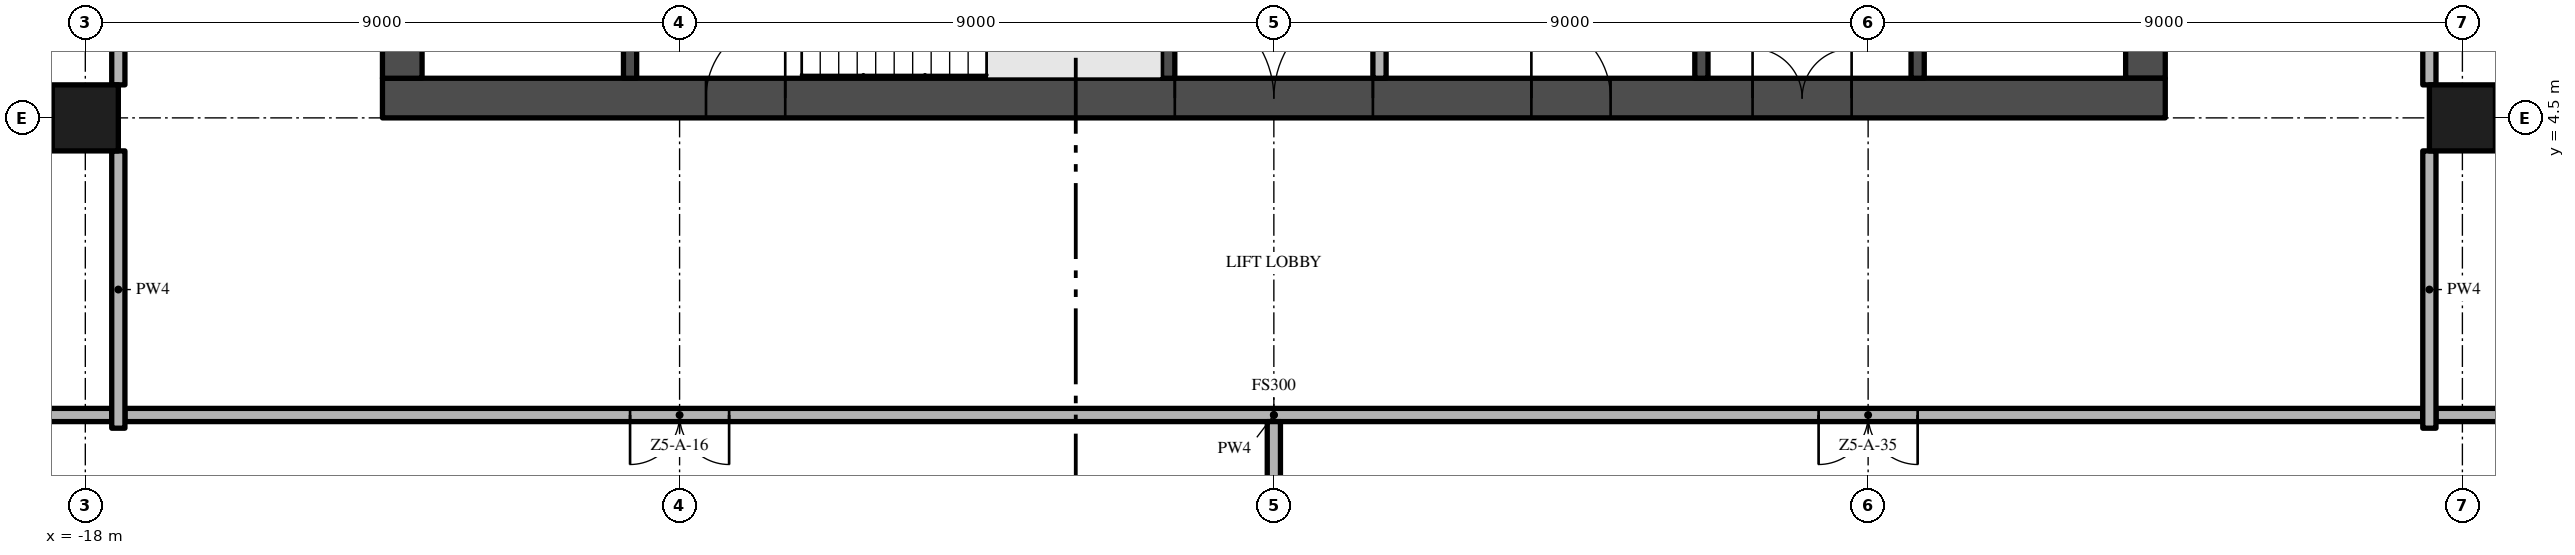
"""IFC4 building model, lengths in metres.
Left out: names, types, materials, properties, quantities, classifications, styles, units other than length and angle.
Written with IfcOpenShell. Run it as: python <this file> out.ifc"""

import sys

from ifc_helpers import new_model, si_unit, direction, frame, frame_2d, origin, origin_2d, place, context, subcontext, project, spatial, rectangle, extrude, element, fill, save


model = new_model("IFC4")
c1 = context("Model", 3, precision=1e-05, world=origin(), true_north=direction((0.0, 1.0)))
c2 = subcontext(c1, "Body", "Model", "MODEL_VIEW")
j1 = project(units=[si_unit("LENGTHUNIT", "METRE"), si_unit("PLANEANGLEUNIT", "RADIAN")], contexts=[c1])
p1 = place(None, origin())
s1 = spatial("IfcSite", under=j1, at=p1, CompositionType="ELEMENT")
p2 = place(p1, origin())
s2 = spatial("IfcBuilding", under=s1, at=p2, CompositionType="ELEMENT")
p3 = place(p2, frame((0.0, 0.0, 242.6)))
s3 = spatial("IfcBuildingStorey", under=s2, at=p3, CompositionType="ELEMENT", Elevation=242.6)
p4 = place(p3, frame((-13.5, 4.8, -0.3), z_axis=(0.0, 0.0, 1.0), x_axis=(1.0, 0.0, 0.0)))
e1 = element("IfcWall", 1, at=p4, inside=s3, PredefinedType="SHEAR", context=c2, shape_type="SweptSolid", body=[
    extrude(rectangle(XDim=27.0, YDim=0.6, at=frame_2d((13.5, 0.0))), origin(), (0.0, 0.0, 1.0), 3.8),
])
p5 = place(p4, frame((12.0, 0.0, 0.3)))
e2 = element("IfcOpeningElement", 2, at=p5, cuts=e1, PredefinedType="OPENING", context=c2, shape_type="SweptSolid", body=[
    extrude(rectangle(XDim=3.0, YDim=2.4, at=frame_2d((1.5, 1.2))), frame((0.0, 0.31, 0.0), z_axis=(0.0, -1.0, 0.0), x_axis=(1.0, 0.0, 0.0)), (0.0, 0.0, 1.0), 0.62),
])
p6 = place(p4, frame((4.9, 0.0, 0.3)))
e3 = element("IfcOpeningElement", 3, at=p6, cuts=e1, PredefinedType="OPENING", context=c2, shape_type="SweptSolid", body=[
    extrude(rectangle(XDim=1.2, YDim=2.2, at=frame_2d((0.6, 1.1))), frame((0.0, 0.31, 0.0), z_axis=(0.0, -1.0, 0.0), x_axis=(1.0, 0.0, 0.0)), (0.0, 0.0, 1.0), 0.62),
])
p7 = place(p4, frame((20.75, 0.0, 0.3)))
e4 = element("IfcOpeningElement", 4, at=p7, cuts=e1, PredefinedType="OPENING", context=c2, shape_type="SweptSolid", body=[
    extrude(rectangle(XDim=1.5, YDim=2.2, at=frame_2d((0.75, 1.1))), frame((0.0, 0.31, 0.0), z_axis=(0.0, -1.0, 0.0), x_axis=(1.0, 0.0, 0.0)), (0.0, 0.0, 1.0), 0.62),
])
p8 = place(p4, frame((17.4, 0.0, 0.3)))
e5 = element("IfcOpeningElement", 5, at=p8, cuts=e1, PredefinedType="OPENING", context=c2, shape_type="SweptSolid", body=[
    extrude(rectangle(XDim=1.2, YDim=2.2, at=frame_2d((0.6, 1.1))), frame((0.0, 0.31, 0.0), z_axis=(0.0, -1.0, 0.0), x_axis=(1.0, 0.0, 0.0)), (0.0, 0.0, 1.0), 0.62),
])
p9 = place(p3, frame((13.2, 5.1, -0.3), z_axis=(0.0, 0.0, 1.0), x_axis=(0.0, 1.0, 0.0)))
e6 = element("IfcWall", 6, at=p9, inside=s3, PredefinedType="SHEAR", context=c2, shape_type="SweptSolid", body=[
    extrude(rectangle(XDim=16.8, YDim=0.6, at=frame_2d((8.4, 0.0))), origin(), (0.0, 0.0, 1.0), 3.8),
])
p10 = place(p9, frame((6.3, 0.0, 0.3)))
e7 = element("IfcOpeningElement", 7, at=p10, cuts=e6, PredefinedType="OPENING", context=c2, shape_type="SweptSolid", body=[
    extrude(rectangle(XDim=1.2, YDim=2.2, at=frame_2d((0.6, 1.1))), frame((0.0, 0.31, 0.0), z_axis=(0.0, -1.0, 0.0), x_axis=(1.0, 0.0, 0.0)), (0.0, 0.0, 1.0), 0.62),
])
p11 = place(p3, frame((-13.2, 21.9, -0.3), z_axis=(0.0, 0.0, 1.0), x_axis=(0.0, -1.0, 0.0)))
e8 = element("IfcWall", 8, at=p11, inside=s3, PredefinedType="SHEAR", context=c2, shape_type="SweptSolid", body=[
    extrude(rectangle(XDim=16.8, YDim=0.6, at=frame_2d((8.4, 0.0))), origin(), (0.0, 0.0, 1.0), 3.8),
])
p12 = place(p11, frame((9.3, 0.0, 0.3)))
e9 = element("IfcOpeningElement", 9, at=p12, cuts=e8, PredefinedType="OPENING", context=c2, shape_type="SweptSolid", body=[
    extrude(rectangle(XDim=1.2, YDim=2.2, at=frame_2d((0.6, 1.1))), frame((0.0, 0.31, 0.0), z_axis=(0.0, -1.0, 0.0), x_axis=(1.0, 0.0, 0.0)), (0.0, 0.0, 1.0), 0.62),
])
for number, where, z_axis, x_axis in (
    (10, (-18.0, 4.5, 0.0), (0.0, 0.0, 1.0), (1.0, 0.0, 0.0)),
    (11, (18.0, 4.5, 0.0), (0.0, 0.0, 1.0), (1.0, 0.0, 0.0)),
):
    element("IfcColumn", number, at=place(p3, frame(where, z_axis=z_axis, x_axis=x_axis)), inside=s3, PredefinedType="COLUMN", context=c2, shape_type="SweptSolid", body=[
        extrude(rectangle(XDim=1.0, YDim=1.0, at=origin_2d()), origin(), (0.0, 0.0, 1.0), 3.5),
    ])
for number, where, z_axis, x_axis in (
    (12, (-9.75, 5.1, 0.0), (0.0, 0.0, 1.0), (0.0, 1.0, 0.0)),
    (13, (-1.6, 5.1, 0.0), (0.0, 0.0, 1.0), (0.0, 1.0, 0.0)),
):
    element("IfcWall", number, at=place(p3, frame(where, z_axis=z_axis, x_axis=x_axis)), inside=s3, PredefinedType="SHEAR", context=c2, shape_type="SweptSolid", body=[
        extrude(rectangle(XDim=2.85, YDim=0.2, at=frame_2d((1.425, 0.0))), origin(), (0.0, 0.0, 1.0), 3.5),
    ])
p13 = place(p3, frame((1.6, 7.5, 0.0), z_axis=(0.0, 0.0, 1.0), x_axis=(0.0, -1.0, 0.0)))
e14 = element("IfcWall", 14, at=p13, inside=s3, PredefinedType="PARTITIONING", context=c2, shape_type="SweptSolid", body=[
    extrude(rectangle(XDim=2.4, YDim=0.2, at=frame_2d((1.2, 0.0))), origin(), (0.0, 0.0, 1.0), 3.5),
])
p14 = place(p13, frame((0.35, 0.0, 0.0)))
e15 = element("IfcOpeningElement", 15, at=p14, cuts=e14, PredefinedType="OPENING", context=c2, shape_type="SweptSolid", body=[
    extrude(rectangle(XDim=0.9, YDim=2.1, at=frame_2d((0.45, 1.05))), frame((0.0, 0.11, 0.0), z_axis=(0.0, -1.0, 0.0), x_axis=(1.0, 0.0, 0.0)), (0.0, 0.0, 1.0), 0.22),
])
p15 = place(p3, frame((6.475, 5.1, 0.0), z_axis=(0.0, 0.0, 1.0), x_axis=(0.0, 1.0, 0.0)))
e16 = element("IfcWall", 16, at=p15, inside=s3, PredefinedType="SHEAR", context=c2, shape_type="SweptSolid", body=[
    extrude(rectangle(XDim=2.4, YDim=0.2, at=frame_2d((1.2, 0.0))), origin(), (0.0, 0.0, 1.0), 3.5),
])
p16 = place(p3, frame((9.75, 5.1, 0.0), z_axis=(0.0, 0.0, 1.0), x_axis=(0.0, 1.0, 0.0)))
e17 = element("IfcWall", 17, at=p16, inside=s3, PredefinedType="SHEAR", context=c2, shape_type="SweptSolid", body=[
    extrude(rectangle(XDim=2.5, YDim=0.2, at=frame_2d((1.25, 0.0))), origin(), (0.0, 0.0, 1.0), 3.5),
])
p17 = place(p16, frame((0.85, 0.0, 0.0)))
e18 = element("IfcOpeningElement", 18, at=p17, cuts=e17, PredefinedType="OPENING", context=c2, shape_type="SweptSolid", body=[
    extrude(rectangle(XDim=1.1, YDim=2.1, at=frame_2d((0.55, 1.05))), frame((0.0, 0.11, 0.0), z_axis=(0.0, -1.0, 0.0), x_axis=(1.0, 0.0, 0.0)), (0.0, 0.0, 1.0), 0.22),
])
p18 = place(p3, frame((17.4, 0.0, 0.0), z_axis=(0.0, 0.0, 1.0), x_axis=(-1.0, 0.0, 0.0)))
e19 = element("IfcWall", 19, at=p18, inside=s3, PredefinedType="PARTITIONING", context=c2, shape_type="SweptSolid", body=[
    extrude(rectangle(XDim=34.8, YDim=0.2, at=frame_2d((17.4, 0.0))), origin(), (0.0, 0.0, 1.0), 3.5),
])
p19 = place(p18, frame((25.65, 0.0, 0.0)))
e20 = element("IfcOpeningElement", 20, at=p19, cuts=e19, PredefinedType="OPENING", context=c2, shape_type="SweptSolid", body=[
    extrude(rectangle(XDim=1.5, YDim=2.4, at=frame_2d((0.75, 1.2))), frame((0.0, 0.11, 0.0), z_axis=(0.0, -1.0, 0.0), x_axis=(1.0, 0.0, 0.0)), (0.0, 0.0, 1.0), 0.22),
])
p20 = place(p18, frame((7.65, 0.0, 0.0)))
e21 = element("IfcOpeningElement", 21, at=p20, cuts=e19, PredefinedType="OPENING", context=c2, shape_type="SweptSolid", body=[
    extrude(rectangle(XDim=1.5, YDim=2.4, at=frame_2d((0.75, 1.2))), frame((0.0, 0.11, 0.0), z_axis=(0.0, -1.0, 0.0), x_axis=(1.0, 0.0, 0.0)), (0.0, 0.0, 1.0), 0.22),
])
for number, where, z_axis, x_axis in (
    (22, (-26.7, 0.0, 0.0), (0.0, 0.0, 1.0), (1.0, 0.0, 0.0)),
    (23, (17.6, 0.0, 0.0), (0.0, 0.0, 1.0), (1.0, 0.0, 0.0)),
):
    element("IfcWall", number, at=place(p3, frame(where, z_axis=z_axis, x_axis=x_axis)), inside=s3, PredefinedType="PARTITIONING", context=c2, shape_type="SweptSolid", body=[
        extrude(rectangle(XDim=9.1, YDim=0.2, at=frame_2d((4.55, 0.0))), origin(), (0.0, 0.0, 1.0), 3.5),
    ])
p21 = place(p3, frame((-17.5, -0.2, 0.0), z_axis=(0.0, 0.0, 1.0), x_axis=(0.0, 1.0, 0.0)))
e24 = element("IfcWall", 24, at=p21, inside=s3, PredefinedType="PARTITIONING", context=c2, shape_type="SweptSolid", body=[
    extrude(rectangle(XDim=4.2, YDim=0.2, at=frame_2d((2.1, 0.0))), origin(), (0.0, 0.0, 1.0), 3.5),
])
p22 = place(p3, frame((-17.5, 5.0, 0.0), z_axis=(0.0, 0.0, 1.0), x_axis=(0.0, 1.0, 0.0)))
e25 = element("IfcWall", 25, at=p22, inside=s3, PredefinedType="PARTITIONING", context=c2, shape_type="SweptSolid", body=[
    extrude(rectangle(XDim=8.0, YDim=0.2, at=frame_2d((4.0, 0.0))), origin(), (0.0, 0.0, 1.0), 3.5),
])
p23 = place(p3, frame((0.0, -4.0, 0.0), z_axis=(0.0, 0.0, 1.0), x_axis=(0.0, 1.0, 0.0)))
e26 = element("IfcWall", 26, at=p23, inside=s3, PredefinedType="PARTITIONING", context=c2, shape_type="SweptSolid", body=[
    extrude(rectangle(XDim=3.9, YDim=0.2, at=frame_2d((1.95, 0.0))), origin(), (0.0, 0.0, 1.0), 3.5),
])
p24 = place(p3, frame((17.5, -0.2, 0.0), z_axis=(0.0, 0.0, 1.0), x_axis=(0.0, 1.0, 0.0)))
e27 = element("IfcWall", 27, at=p24, inside=s3, PredefinedType="PARTITIONING", context=c2, shape_type="SweptSolid", body=[
    extrude(rectangle(XDim=4.2, YDim=0.2, at=frame_2d((2.1, 0.0))), origin(), (0.0, 0.0, 1.0), 3.5),
])
p25 = place(p3, frame((17.5, 5.0, 0.0), z_axis=(0.0, 0.0, 1.0), x_axis=(0.0, 1.0, 0.0)))
e28 = element("IfcWall", 28, at=p25, inside=s3, PredefinedType="PARTITIONING", context=c2, shape_type="SweptSolid", body=[
    extrude(rectangle(XDim=8.0, YDim=0.2, at=frame_2d((4.0, 0.0))), origin(), (0.0, 0.0, 1.0), 3.5),
])
p26 = place(p5, frame((3.0, 0.0, 0.0), z_axis=(0.0, 0.0, 1.0), x_axis=(-1.0, 0.0, 0.0)))
e29 = element("IfcDoor", 29, at=p26, inside=s3, OperationType="DOUBLE_DOOR_SINGLE_SWING", PredefinedType="DOOR", context=c2, shape_type="SweptSolid", body=[
    extrude(rectangle(XDim=3.0, YDim=2.4, at=frame_2d((1.5, 1.2))), frame((0.0, 0.025, 0.0), z_axis=(0.0, -1.0, 0.0), x_axis=(1.0, 0.0, 0.0)), (0.0, 0.0, 1.0), 0.05),
])
fill(e2, e29)
p27 = place(p6, frame((1.2, 0.0, 0.0), z_axis=(0.0, 0.0, 1.0), x_axis=(-1.0, 0.0, 0.0)))
e30 = element("IfcDoor", 30, at=p27, inside=s3, OperationType="SINGLE_SWING_LEFT", PredefinedType="DOOR", context=c2, shape_type="SweptSolid", body=[
    extrude(rectangle(XDim=1.2, YDim=2.2, at=frame_2d((0.6, 1.1))), frame((0.0, 0.025, 0.0), z_axis=(0.0, -1.0, 0.0), x_axis=(1.0, 0.0, 0.0)), (0.0, 0.0, 1.0), 0.05),
])
fill(e3, e30)
p28 = place(p7, frame((1.5, 0.0, 0.0), z_axis=(0.0, 0.0, 1.0), x_axis=(-1.0, 0.0, 0.0)))
e31 = element("IfcDoor", 31, at=p28, inside=s3, OperationType="DOUBLE_DOOR_SINGLE_SWING", PredefinedType="DOOR", context=c2, shape_type="SweptSolid", body=[
    extrude(rectangle(XDim=1.5, YDim=2.2, at=frame_2d((0.75, 1.1))), frame((0.0, 0.025, 0.0), z_axis=(0.0, -1.0, 0.0), x_axis=(1.0, 0.0, 0.0)), (0.0, 0.0, 1.0), 0.05),
])
fill(e4, e31)
p29 = place(p8, frame((1.2, 0.0, 0.0), z_axis=(0.0, 0.0, 1.0), x_axis=(-1.0, 0.0, 0.0)))
e32 = element("IfcDoor", 32, at=p29, inside=s3, OperationType="SINGLE_SWING_RIGHT", PredefinedType="DOOR", context=c2, shape_type="SweptSolid", body=[
    extrude(rectangle(XDim=1.2, YDim=2.2, at=frame_2d((0.6, 1.1))), frame((0.0, 0.025, 0.0), z_axis=(0.0, -1.0, 0.0), x_axis=(1.0, 0.0, 0.0)), (0.0, 0.0, 1.0), 0.05),
])
fill(e5, e32)
p30 = place(p19, origin())
e33 = element("IfcDoor", 33, at=p30, inside=s3, OperationType="DOUBLE_DOOR_SINGLE_SWING", PredefinedType="DOOR", context=c2, shape_type="SweptSolid", body=[
    extrude(rectangle(XDim=1.5, YDim=2.4, at=frame_2d((0.75, 1.2))), frame((0.0, 0.025, 0.0), z_axis=(0.0, -1.0, 0.0), x_axis=(1.0, 0.0, 0.0)), (0.0, 0.0, 1.0), 0.05),
])
fill(e20, e33)
p31 = place(p20, origin())
e34 = element("IfcDoor", 34, at=p31, inside=s3, OperationType="DOUBLE_DOOR_SINGLE_SWING", PredefinedType="DOOR", context=c2, shape_type="SweptSolid", body=[
    extrude(rectangle(XDim=1.5, YDim=2.4, at=frame_2d((0.75, 1.2))), frame((0.0, 0.025, 0.0), z_axis=(0.0, -1.0, 0.0), x_axis=(1.0, 0.0, 0.0)), (0.0, 0.0, 1.0), 0.05),
])
fill(e21, e34)
save(model, sys.argv[1])
